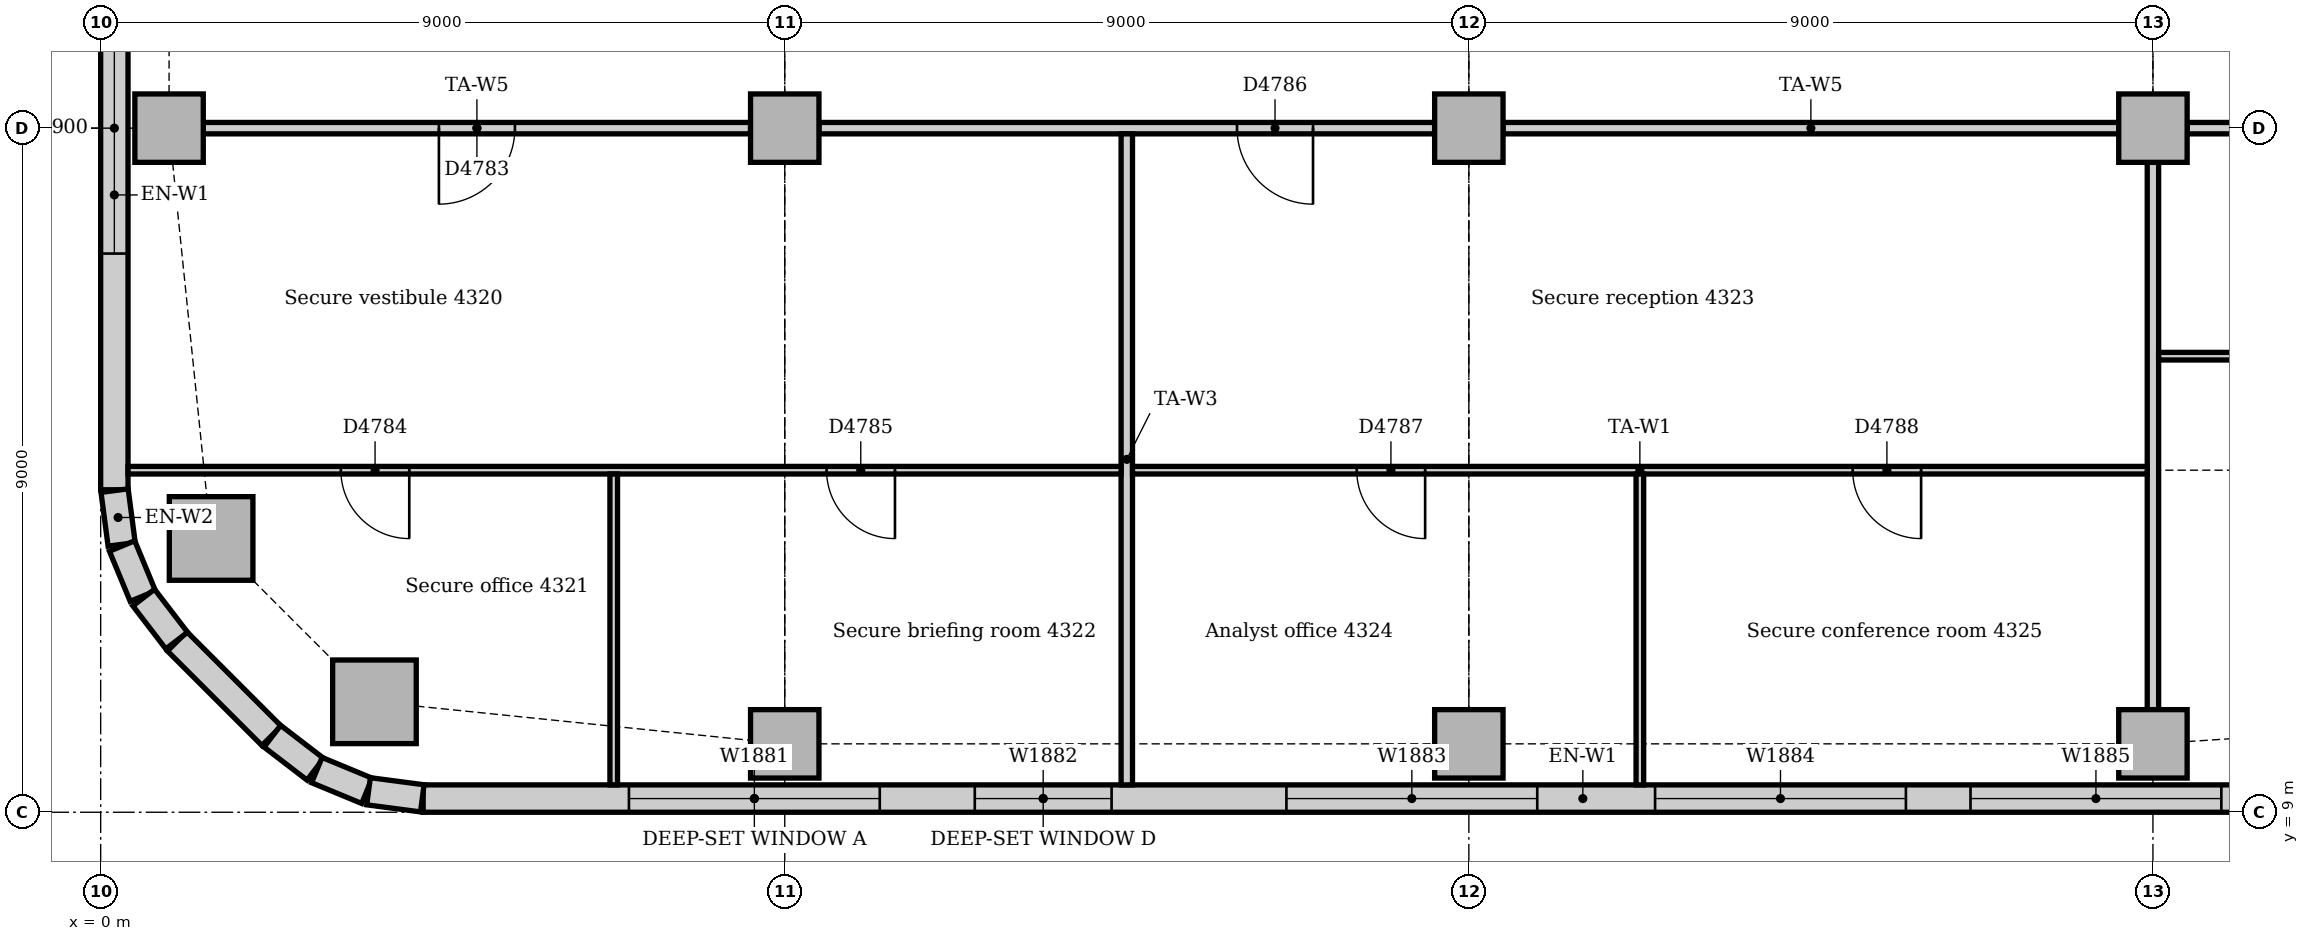
"""IFC4 building model, lengths in metres.
Left out: names, types, materials, properties, quantities, classifications, styles, units other than length and angle.
Written with IfcOpenShell. Run it as: python <this file> out.ifc"""

import sys

from ifc_helpers import new_model, si_unit, direction, frame, frame_2d, origin, origin_2d, place, context, subcontext, project, spatial, rectangle, extrude, element, fill, save


model = new_model("IFC4")
c1 = context("Model", 3, precision=1e-05, world=origin(), true_north=direction((0.0, 1.0)))
c2 = subcontext(c1, "Body", "Model", "MODEL_VIEW")
j1 = project(units=[si_unit("LENGTHUNIT", "METRE"), si_unit("PLANEANGLEUNIT", "RADIAN")], contexts=[c1])
p1 = place(None, origin())
s1 = spatial("IfcSite", under=j1, at=p1, CompositionType="ELEMENT")
p2 = place(p1, origin())
s2 = spatial("IfcBuilding", under=s1, at=p2, CompositionType="ELEMENT")
p3 = place(p2, frame((0.0, 0.0, 181.0)))
s3 = spatial("IfcBuildingStorey", under=s2, at=p3, CompositionType="ELEMENT", Elevation=181.0)
for number, where, z_axis, x_axis in (
    (1, (3.602, 10.453, 0.0), (0.0, 0.0, 1.0), (1.0, 0.0, 0.0)),
    (2, (1.453, 12.602, 0.0), (0.0, 0.0, 1.0), (1.0, 0.0, 0.0)),
):
    element("IfcColumn", number, at=place(p3, frame(where, z_axis=z_axis, x_axis=x_axis)), inside=s3, PredefinedType="COLUMN", context=c2, shape_type="SweptSolid", body=[
        extrude(rectangle(XDim=1.1, YDim=1.1, at=origin_2d()), origin(), (0.0, 0.0, 1.0), 3.85),
    ])
for number, where, z_axis, x_axis in (
    (3, (9.0, 9.9, 0.0), (0.0, 0.0, 1.0), (1.0, 0.0, 0.0)),
    (4, (18.0, 9.9, 0.0), (0.0, 0.0, 1.0), (1.0, 0.0, 0.0)),
    (5, (27.0, 9.9, 0.0), (0.0, 0.0, 1.0), (1.0, 0.0, 0.0)),
    (6, (0.9, 18.0, 0.0), (0.0, 0.0, 1.0), (1.0, 0.0, 0.0)),
    (7, (9.0, 18.0, 0.0), (0.0, 0.0, 1.0), (1.0, 0.0, 0.0)),
    (8, (18.0, 18.0, 0.0), (0.0, 0.0, 1.0), (1.0, 0.0, 0.0)),
    (9, (27.0, 18.0, 0.0), (0.0, 0.0, 1.0), (1.0, 0.0, 0.0)),
):
    element("IfcColumn", number, at=place(p3, frame(where, z_axis=z_axis, x_axis=x_axis)), inside=s3, PredefinedType="COLUMN", context=c2, shape_type="SweptSolid", body=[
        extrude(rectangle(XDim=0.9, YDim=0.9, at=origin_2d()), origin(), (0.0, 0.0, 1.0), 3.85),
    ])
p4 = place(p3, frame((4.243, 9.18, 0.0), z_axis=(0.0, 0.0, 1.0), x_axis=(1.0, 0.0, 0.0)))
e10 = element("IfcWall", 10, at=p4, inside=s3, PredefinedType="STANDARD", context=c2, shape_type="SweptSolid", body=[
    extrude(rectangle(XDim=30.515, YDim=0.36, at=frame_2d((15.257, 0.0))), origin(), (0.0, 0.0, 1.0), 3.85),
])
p5 = place(p4, frame((2.707, 0.0, 0.9)))
e11 = element("IfcOpeningElement", 11, at=p5, cuts=e10, PredefinedType="OPENING", context=c2, shape_type="SweptSolid", body=[
    extrude(rectangle(XDim=3.3, YDim=1.6, at=frame_2d((1.65, 0.8))), frame((0.0, 0.19, 0.0), z_axis=(0.0, -1.0, 0.0), x_axis=(1.0, 0.0, 0.0)), (0.0, 0.0, 1.0), 0.38),
])
p6 = place(p4, frame((7.257, 0.0, 0.9)))
e12 = element("IfcOpeningElement", 12, at=p6, cuts=e10, PredefinedType="OPENING", context=c2, shape_type="SweptSolid", body=[
    extrude(rectangle(XDim=1.8, YDim=1.6, at=frame_2d((0.9, 0.8))), frame((0.0, 0.19, 0.0), z_axis=(0.0, -1.0, 0.0), x_axis=(1.0, 0.0, 0.0)), (0.0, 0.0, 1.0), 0.38),
])
p7 = place(p4, frame((11.357, 0.0, 0.9)))
e13 = element("IfcOpeningElement", 13, at=p7, cuts=e10, PredefinedType="OPENING", context=c2, shape_type="SweptSolid", body=[
    extrude(rectangle(XDim=3.3, YDim=1.6, at=frame_2d((1.65, 0.8))), frame((0.0, 0.19, 0.0), z_axis=(0.0, -1.0, 0.0), x_axis=(1.0, 0.0, 0.0)), (0.0, 0.0, 1.0), 0.38),
])
p8 = place(p4, frame((16.207, 0.0, 0.9)))
e14 = element("IfcOpeningElement", 14, at=p8, cuts=e10, PredefinedType="OPENING", context=c2, shape_type="SweptSolid", body=[
    extrude(rectangle(XDim=3.3, YDim=1.6, at=frame_2d((1.65, 0.8))), frame((0.0, 0.19, 0.0), z_axis=(0.0, -1.0, 0.0), x_axis=(1.0, 0.0, 0.0)), (0.0, 0.0, 1.0), 0.38),
])
p9 = place(p4, frame((20.357, 0.0, 0.9)))
e15 = element("IfcOpeningElement", 15, at=p9, cuts=e10, PredefinedType="OPENING", context=c2, shape_type="SweptSolid", body=[
    extrude(rectangle(XDim=3.3, YDim=1.6, at=frame_2d((1.65, 0.8))), frame((0.0, 0.19, 0.0), z_axis=(0.0, -1.0, 0.0), x_axis=(1.0, 0.0, 0.0)), (0.0, 0.0, 1.0), 0.38),
])
p10 = place(p4, frame((24.857, 0.0, 0.9)))
e16 = element("IfcOpeningElement", 16, at=p10, cuts=e10, PredefinedType="OPENING", context=c2, shape_type="SweptSolid", body=[
    extrude(rectangle(XDim=3.3, YDim=1.6, at=frame_2d((1.65, 0.8))), frame((0.0, 0.19, 0.0), z_axis=(0.0, -1.0, 0.0), x_axis=(1.0, 0.0, 0.0)), (0.0, 0.0, 1.0), 0.38),
])
p11 = place(p3, frame((0.18, 21.0, 0.0), z_axis=(0.0, 0.0, 1.0), x_axis=(0.0, -1.0, 0.0)))
e17 = element("IfcWall", 17, at=p11, inside=s3, PredefinedType="STANDARD", context=c2, shape_type="SweptSolid", body=[
    extrude(rectangle(XDim=7.757, YDim=0.36, at=frame_2d((3.879, 0.0))), origin(), (0.0, 0.0, 1.0), 3.85),
])
p12 = place(p11, frame((1.35, 0.0, 0.9)))
e18 = element("IfcOpeningElement", 18, at=p12, cuts=e17, PredefinedType="OPENING", context=c2, shape_type="SweptSolid", body=[
    extrude(rectangle(XDim=3.3, YDim=1.6, at=frame_2d((1.65, 0.8))), frame((0.0, 0.19, 0.0), z_axis=(0.0, -1.0, 0.0), x_axis=(1.0, 0.0, 0.0)), (0.0, 0.0, 1.0), 0.38),
])
p13 = place(p3, frame((1.006, 11.249, 0.0), z_axis=(0.0, 0.0, 1.0), x_axis=(0.707106781187, -0.707106781187, 0.0)))
e19 = element("IfcWall", 19, at=p13, inside=s3, PredefinedType="STANDARD", context=c2, shape_type="SweptSolid", body=[
    extrude(rectangle(XDim=1.757, YDim=0.36, at=frame_2d((0.879, 0.0))), origin(), (0.0, 0.0, 1.0), 3.85),
])
for number, where, z_axis, x_axis in (
    (20, (0.183, 13.231, 0.0), (0.0, 0.0, 1.0), (0.131, -0.991, 0.0)),
    (21, (0.282, 12.503, 0.0), (0.0, 0.0, 1.0), (0.383, -0.924, 0.0)),
):
    element("IfcWall", number, at=place(p3, frame(where, z_axis=z_axis, x_axis=x_axis)), inside=s3, PredefinedType="STANDARD", context=c2, shape_type="SweptSolid", body=[
        extrude(rectangle(XDim=0.713, YDim=0.36, at=frame_2d((0.356, 0.0))), origin(), (0.0, 0.0, 1.0), 3.85),
    ])
for number, where, z_axis, x_axis in (
    (22, (0.566, 11.825, 0.0), (0.0, 0.0, 1.0), (0.609, -0.793, 0.0)),
    (23, (2.259, 10.0, 0.0), (0.0, 0.0, 1.0), (0.793, -0.609, 0.0)),
):
    element("IfcWall", number, at=place(p3, frame(where, z_axis=z_axis, x_axis=x_axis)), inside=s3, PredefinedType="STANDARD", context=c2, shape_type="SweptSolid", body=[
        extrude(rectangle(XDim=0.713, YDim=0.36, at=frame_2d((0.357, 0.0))), origin(), (0.0, 0.0, 1.0), 3.85),
    ])
for number, where, z_axis, x_axis in (
    (24, (2.844, 9.555, 0.0), (0.0, 0.0, 1.0), (0.924, -0.383, 0.0)),
    (25, (3.524, 9.276, 0.0), (0.0, 0.0, 1.0), (0.991, -0.131, 0.0)),
):
    element("IfcWall", number, at=place(p3, frame(where, z_axis=z_axis, x_axis=x_axis)), inside=s3, PredefinedType="STANDARD", context=c2, shape_type="SweptSolid", body=[
        extrude(rectangle(XDim=0.713, YDim=0.36, at=frame_2d((0.356, 0.0))), origin(), (0.0, 0.0, 1.0), 3.85),
    ])
p14 = place(p3, frame((1.35, 18.0, 0.0), z_axis=(0.0, 0.0, 1.0), x_axis=(1.0, 0.0, 0.0)))
e26 = element("IfcWall", 26, at=p14, inside=s3, PredefinedType="PARTITIONING", context=c2, shape_type="SweptSolid", body=[
    extrude(rectangle(XDim=7.2, YDim=0.15, at=frame_2d((3.6, 0.0))), origin(), (0.0, 0.0, 1.0), 3.262),
])
p15 = place(p14, frame((3.1, 0.0, 0.0)))
e27 = element("IfcOpeningElement", 27, at=p15, cuts=e26, PredefinedType="OPENING", context=c2, shape_type="SweptSolid", body=[
    extrude(rectangle(XDim=1.0, YDim=2.1, at=frame_2d((0.5, 1.05))), frame((0.0, 0.085, 0.0), z_axis=(0.0, -1.0, 0.0), x_axis=(1.0, 0.0, 0.0)), (0.0, 0.0, 1.0), 0.17),
])
p16 = place(p3, frame((9.45, 18.0, 0.0), z_axis=(0.0, 0.0, 1.0), x_axis=(1.0, 0.0, 0.0)))
e28 = element("IfcWall", 28, at=p16, inside=s3, PredefinedType="PARTITIONING", context=c2, shape_type="SweptSolid", body=[
    extrude(rectangle(XDim=8.1, YDim=0.15, at=frame_2d((4.05, 0.0))), origin(), (0.0, 0.0, 1.0), 3.262),
])
p17 = place(p16, frame((5.5, 0.0, 0.0)))
e29 = element("IfcOpeningElement", 29, at=p17, cuts=e28, PredefinedType="OPENING", context=c2, shape_type="SweptSolid", body=[
    extrude(rectangle(XDim=1.0, YDim=2.1, at=frame_2d((0.5, 1.05))), frame((0.0, 0.085, 0.0), z_axis=(0.0, -1.0, 0.0), x_axis=(1.0, 0.0, 0.0)), (0.0, 0.0, 1.0), 0.17),
])
p18 = place(p3, frame((18.45, 18.0, 0.0), z_axis=(0.0, 0.0, 1.0), x_axis=(1.0, 0.0, 0.0)))
e30 = element("IfcWall", 30, at=p18, inside=s3, PredefinedType="PARTITIONING", context=c2, shape_type="SweptSolid", body=[
    extrude(rectangle(XDim=8.1, YDim=0.15, at=frame_2d((4.05, 0.0))), origin(), (0.0, 0.0, 1.0), 3.262),
])
p19 = place(p3, frame((27.45, 18.0, 0.0), z_axis=(0.0, 0.0, 1.0), x_axis=(1.0, 0.0, 0.0)))
e31 = element("IfcWall", 31, at=p19, inside=s3, PredefinedType="PARTITIONING", context=c2, shape_type="SweptSolid", body=[
    extrude(rectangle(XDim=8.1, YDim=0.15, at=frame_2d((4.05, 0.0))), origin(), (0.0, 0.0, 1.0), 3.262),
])
p20 = place(p19, frame((3.55, 0.0, 0.0)))
e32 = element("IfcOpeningElement", 32, at=p20, cuts=e31, PredefinedType="OPENING", context=c2, shape_type="SweptSolid", body=[
    extrude(rectangle(XDim=1.0, YDim=2.1, at=frame_2d((0.5, 1.05))), frame((0.0, 0.085, 0.0), z_axis=(0.0, -1.0, 0.0), x_axis=(1.0, 0.0, 0.0)), (0.0, 0.0, 1.0), 0.17),
])
p21 = place(p3, frame((13.5, 9.36, 0.0), z_axis=(0.0, 0.0, 1.0), x_axis=(0.0, 1.0, 0.0)))
e33 = element("IfcWall", 33, at=p21, inside=s3, PredefinedType="PARTITIONING", context=c2, shape_type="SweptSolid", body=[
    extrude(rectangle(XDim=8.565, YDim=0.15, at=frame_2d((4.282, 0.0))), origin(), (0.0, 0.0, 1.0), 3.85),
])
p22 = place(p3, frame((27.0, 10.35, 0.0), z_axis=(0.0, 0.0, 1.0), x_axis=(0.0, 1.0, 0.0)))
e34 = element("IfcWall", 34, at=p22, inside=s3, PredefinedType="PARTITIONING", context=c2, shape_type="SweptSolid", body=[
    extrude(rectangle(XDim=7.2, YDim=0.15, at=frame_2d((3.6, 0.0))), origin(), (0.0, 0.0, 1.0), 3.362),
])
p23 = place(p3, frame((13.575, 13.5, 0.0), z_axis=(0.0, 0.0, 1.0), x_axis=(1.0, 0.0, 0.0)))
e35 = element("IfcWall", 35, at=p23, inside=s3, PredefinedType="PARTITIONING", context=c2, shape_type="SweptSolid", body=[
    extrude(rectangle(XDim=13.35, YDim=0.1, at=frame_2d((6.675, 0.0))), origin(), (0.0, 0.0, 1.0), 3.4),
])
p24 = place(p23, frame((2.95, 0.0, 0.0)))
e36 = element("IfcOpeningElement", 36, at=p24, cuts=e35, PredefinedType="OPENING", context=c2, shape_type="SweptSolid", body=[
    extrude(rectangle(XDim=0.9, YDim=2.1, at=frame_2d((0.45, 1.05))), frame((0.0, 0.06, 0.0), z_axis=(0.0, -1.0, 0.0), x_axis=(1.0, 0.0, 0.0)), (0.0, 0.0, 1.0), 0.12),
])
p25 = place(p23, frame((9.475, 0.0, 0.0)))
e37 = element("IfcOpeningElement", 37, at=p25, cuts=e35, PredefinedType="OPENING", context=c2, shape_type="SweptSolid", body=[
    extrude(rectangle(XDim=0.9, YDim=2.1, at=frame_2d((0.45, 1.05))), frame((0.0, 0.06, 0.0), z_axis=(0.0, -1.0, 0.0), x_axis=(1.0, 0.0, 0.0)), (0.0, 0.0, 1.0), 0.12),
])
p26 = place(p3, frame((0.36, 13.5, 0.0), z_axis=(0.0, 0.0, 1.0), x_axis=(1.0, 0.0, 0.0)))
e38 = element("IfcWall", 38, at=p26, inside=s3, PredefinedType="PARTITIONING", context=c2, shape_type="SweptSolid", body=[
    extrude(rectangle(XDim=13.065, YDim=0.1, at=frame_2d((6.532, 0.0))), origin(), (0.0, 0.0, 1.0), 3.4),
])
p27 = place(p26, frame((2.8, 0.0, 0.0)))
e39 = element("IfcOpeningElement", 39, at=p27, cuts=e38, PredefinedType="OPENING", context=c2, shape_type="SweptSolid", body=[
    extrude(rectangle(XDim=0.9, YDim=2.1, at=frame_2d((0.45, 1.05))), frame((0.0, 0.06, 0.0), z_axis=(0.0, -1.0, 0.0), x_axis=(1.0, 0.0, 0.0)), (0.0, 0.0, 1.0), 0.12),
])
p28 = place(p26, frame((9.19, 0.0, 0.0)))
e40 = element("IfcOpeningElement", 40, at=p28, cuts=e38, PredefinedType="OPENING", context=c2, shape_type="SweptSolid", body=[
    extrude(rectangle(XDim=0.9, YDim=2.1, at=frame_2d((0.45, 1.05))), frame((0.0, 0.06, 0.0), z_axis=(0.0, -1.0, 0.0), x_axis=(1.0, 0.0, 0.0)), (0.0, 0.0, 1.0), 0.12),
])
p29 = place(p3, frame((27.075, 15.0, 0.0), z_axis=(0.0, 0.0, 1.0), x_axis=(1.0, 0.0, 0.0)))
e41 = element("IfcWall", 41, at=p29, inside=s3, PredefinedType="PARTITIONING", context=c2, shape_type="SweptSolid", body=[
    extrude(rectangle(XDim=13.35, YDim=0.1, at=frame_2d((6.675, 0.0))), origin(), (0.0, 0.0, 1.0), 3.85),
])
p30 = place(p29, frame((6.2, 0.0, 0.0)))
e42 = element("IfcOpeningElement", 42, at=p30, cuts=e41, PredefinedType="OPENING", context=c2, shape_type="SweptSolid", body=[
    extrude(rectangle(XDim=0.9, YDim=2.1, at=frame_2d((0.45, 1.05))), frame((0.0, 0.06, 0.0), z_axis=(0.0, -1.0, 0.0), x_axis=(1.0, 0.0, 0.0)), (0.0, 0.0, 1.0), 0.12),
])
for number, where, z_axis, x_axis in (
    (43, (6.75, 9.36, 0.0), (0.0, 0.0, 1.0), (0.0, 1.0, 0.0)),
    (44, (20.25, 9.36, 0.0), (0.0, 0.0, 1.0), (0.0, 1.0, 0.0)),
):
    element("IfcWall", number, at=place(p3, frame(where, z_axis=z_axis, x_axis=x_axis)), inside=s3, PredefinedType="PARTITIONING", context=c2, shape_type="SweptSolid", body=[
        extrude(rectangle(XDim=4.09, YDim=0.1, at=frame_2d((2.045, 0.0))), origin(), (0.0, 0.0, 1.0), 3.85),
    ])
p31 = place(p5, origin())
e45 = element("IfcWindow", 45, at=p31, inside=s3, PartitioningType="SINGLE_PANEL", PredefinedType="WINDOW", context=c2, shape_type="SweptSolid", body=[
    extrude(rectangle(XDim=3.3, YDim=1.6, at=frame_2d((1.65, 0.8))), frame((0.0, 0.13, 0.0), z_axis=(0.0, -1.0, 0.0), x_axis=(1.0, 0.0, 0.0)), (0.0, 0.0, 1.0), 0.06),
])
fill(e11, e45)
p32 = place(p6, origin())
e46 = element("IfcWindow", 46, at=p32, inside=s3, PartitioningType="SINGLE_PANEL", PredefinedType="WINDOW", context=c2, shape_type="SweptSolid", body=[
    extrude(rectangle(XDim=1.8, YDim=1.6, at=frame_2d((0.9, 0.8))), frame((0.0, 0.13, 0.0), z_axis=(0.0, -1.0, 0.0), x_axis=(1.0, 0.0, 0.0)), (0.0, 0.0, 1.0), 0.06),
])
fill(e12, e46)
p33 = place(p7, origin())
e47 = element("IfcWindow", 47, at=p33, inside=s3, PartitioningType="SINGLE_PANEL", PredefinedType="WINDOW", context=c2, shape_type="SweptSolid", body=[
    extrude(rectangle(XDim=3.3, YDim=1.6, at=frame_2d((1.65, 0.8))), frame((0.0, 0.13, 0.0), z_axis=(0.0, -1.0, 0.0), x_axis=(1.0, 0.0, 0.0)), (0.0, 0.0, 1.0), 0.06),
])
fill(e13, e47)
p34 = place(p8, origin())
e48 = element("IfcWindow", 48, at=p34, inside=s3, PartitioningType="SINGLE_PANEL", PredefinedType="WINDOW", context=c2, shape_type="SweptSolid", body=[
    extrude(rectangle(XDim=3.3, YDim=1.6, at=frame_2d((1.65, 0.8))), frame((0.0, 0.13, 0.0), z_axis=(0.0, -1.0, 0.0), x_axis=(1.0, 0.0, 0.0)), (0.0, 0.0, 1.0), 0.06),
])
fill(e14, e48)
p35 = place(p9, origin())
e49 = element("IfcWindow", 49, at=p35, inside=s3, PartitioningType="SINGLE_PANEL", PredefinedType="WINDOW", context=c2, shape_type="SweptSolid", body=[
    extrude(rectangle(XDim=3.3, YDim=1.6, at=frame_2d((1.65, 0.8))), frame((0.0, 0.13, 0.0), z_axis=(0.0, -1.0, 0.0), x_axis=(1.0, 0.0, 0.0)), (0.0, 0.0, 1.0), 0.06),
])
fill(e15, e49)
p36 = place(p12, origin())
e50 = element("IfcWindow", 50, at=p36, inside=s3, PartitioningType="SINGLE_PANEL", PredefinedType="WINDOW", context=c2, shape_type="SweptSolid", body=[
    extrude(rectangle(XDim=3.3, YDim=1.6, at=frame_2d((1.65, 0.8))), frame((0.0, 0.13, 0.0), z_axis=(0.0, -1.0, 0.0), x_axis=(1.0, 0.0, 0.0)), (0.0, 0.0, 1.0), 0.06),
])
fill(e18, e50)
p37 = place(p15, frame((1.0, 0.0, 0.0), z_axis=(0.0, 0.0, 1.0), x_axis=(-1.0, 0.0, 0.0)))
e51 = element("IfcDoor", 51, at=p37, inside=s3, OperationType="SINGLE_SWING_RIGHT", PredefinedType="DOOR", context=c2, shape_type="SweptSolid", body=[
    extrude(rectangle(XDim=1.0, YDim=2.1, at=frame_2d((0.5, 1.05))), frame((0.0, 0.025, 0.0), z_axis=(0.0, -1.0, 0.0), x_axis=(1.0, 0.0, 0.0)), (0.0, 0.0, 1.0), 0.05),
])
fill(e27, e51)
p38 = place(p27, frame((0.9, 0.0, 0.0), z_axis=(0.0, 0.0, 1.0), x_axis=(-1.0, 0.0, 0.0)))
e52 = element("IfcDoor", 52, at=p38, inside=s3, OperationType="SINGLE_SWING_LEFT", PredefinedType="DOOR", context=c2, shape_type="SweptSolid", body=[
    extrude(rectangle(XDim=0.9, YDim=2.1, at=frame_2d((0.45, 1.05))), frame((0.0, 0.025, 0.0), z_axis=(0.0, -1.0, 0.0), x_axis=(1.0, 0.0, 0.0)), (0.0, 0.0, 1.0), 0.05),
])
fill(e39, e52)
p39 = place(p28, frame((0.9, 0.0, 0.0), z_axis=(0.0, 0.0, 1.0), x_axis=(-1.0, 0.0, 0.0)))
e53 = element("IfcDoor", 53, at=p39, inside=s3, OperationType="SINGLE_SWING_LEFT", PredefinedType="DOOR", context=c2, shape_type="SweptSolid", body=[
    extrude(rectangle(XDim=0.9, YDim=2.1, at=frame_2d((0.45, 1.05))), frame((0.0, 0.025, 0.0), z_axis=(0.0, -1.0, 0.0), x_axis=(1.0, 0.0, 0.0)), (0.0, 0.0, 1.0), 0.05),
])
fill(e40, e53)
p40 = place(p17, frame((1.0, 0.0, 0.0), z_axis=(0.0, 0.0, 1.0), x_axis=(-1.0, 0.0, 0.0)))
e54 = element("IfcDoor", 54, at=p40, inside=s3, OperationType="SINGLE_SWING_LEFT", PredefinedType="DOOR", context=c2, shape_type="SweptSolid", body=[
    extrude(rectangle(XDim=1.0, YDim=2.1, at=frame_2d((0.5, 1.05))), frame((0.0, 0.025, 0.0), z_axis=(0.0, -1.0, 0.0), x_axis=(1.0, 0.0, 0.0)), (0.0, 0.0, 1.0), 0.05),
])
fill(e29, e54)
p41 = place(p24, frame((0.9, 0.0, 0.0), z_axis=(0.0, 0.0, 1.0), x_axis=(-1.0, 0.0, 0.0)))
e55 = element("IfcDoor", 55, at=p41, inside=s3, OperationType="SINGLE_SWING_LEFT", PredefinedType="DOOR", context=c2, shape_type="SweptSolid", body=[
    extrude(rectangle(XDim=0.9, YDim=2.1, at=frame_2d((0.45, 1.05))), frame((0.0, 0.025, 0.0), z_axis=(0.0, -1.0, 0.0), x_axis=(1.0, 0.0, 0.0)), (0.0, 0.0, 1.0), 0.05),
])
fill(e36, e55)
p42 = place(p25, frame((0.9, 0.0, 0.0), z_axis=(0.0, 0.0, 1.0), x_axis=(-1.0, 0.0, 0.0)))
e56 = element("IfcDoor", 56, at=p42, inside=s3, OperationType="SINGLE_SWING_LEFT", PredefinedType="DOOR", context=c2, shape_type="SweptSolid", body=[
    extrude(rectangle(XDim=0.9, YDim=2.1, at=frame_2d((0.45, 1.05))), frame((0.0, 0.025, 0.0), z_axis=(0.0, -1.0, 0.0), x_axis=(1.0, 0.0, 0.0)), (0.0, 0.0, 1.0), 0.05),
])
fill(e37, e56)
save(model, sys.argv[1])
